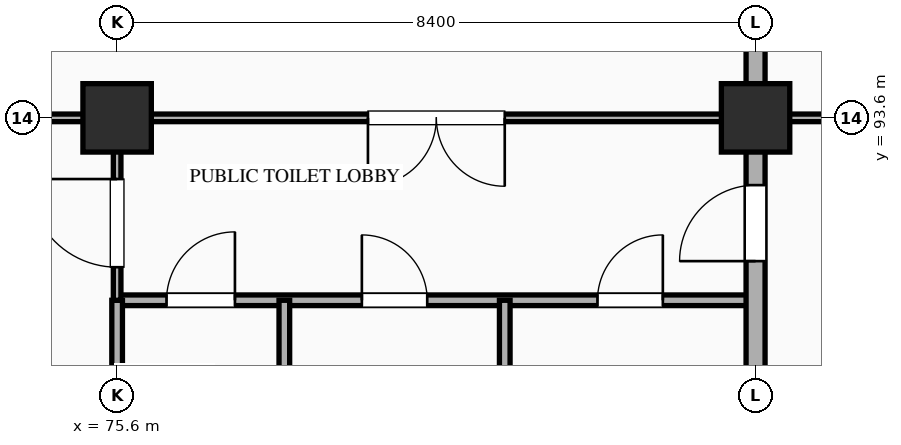
"""IFC4 building model, lengths in metres.
Left out: names, types, materials, properties, quantities, classifications, styles, units other than length and angle.
Written with IfcOpenShell. Run it as: python <this file> out.ifc"""

import sys

from ifc_helpers import new_model, si_unit, direction, frame, frame_2d, origin, origin_2d, place, context, subcontext, project, spatial, rectangle, extrude, element, fill, save


model = new_model("IFC4")
c1 = context("Model", 3, precision=1e-05, world=origin(), true_north=direction((0.0, 1.0)))
c2 = subcontext(c1, "Body", "Model", "MODEL_VIEW")
j1 = project(units=[si_unit("LENGTHUNIT", "METRE"), si_unit("PLANEANGLEUNIT", "RADIAN")], contexts=[c1])
p1 = place(None, origin())
s1 = spatial("IfcSite", under=j1, at=p1, CompositionType="ELEMENT")
p2 = place(p1, origin())
s2 = spatial("IfcBuilding", under=s1, at=p2, CompositionType="ELEMENT")
p3 = place(p2, origin())
s3 = spatial("IfcBuildingStorey", under=s2, at=p3, CompositionType="ELEMENT", Elevation=0.0)
for number, where, z_axis, x_axis in (
    (1, (75.6, 93.6, 0.0), (0.0, 0.0, 1.0), (1.0, 0.0, 0.0)),
    (2, (84.0, 93.6, 0.0), (0.0, 0.0, 1.0), (1.0, 0.0, 0.0)),
):
    element("IfcColumn", number, at=place(p3, frame(where, z_axis=z_axis, x_axis=x_axis)), inside=s3, PredefinedType="COLUMN", context=c2, shape_type="SweptSolid", body=[
        extrude(rectangle(XDim=0.9, YDim=0.9, at=origin_2d()), origin(), (0.0, 0.0, 1.0), 5.4),
    ])
p4 = place(p3, frame((75.6, 91.2, 0.0), z_axis=(0.0, 0.0, 1.0), x_axis=(1.0, 0.0, 0.0)))
e3 = element("IfcWall", 3, at=p4, inside=s3, PredefinedType="STANDARD", context=c2, shape_type="SweptSolid", body=[
    extrude(rectangle(XDim=8.4, YDim=0.14, at=frame_2d((4.2, 0.0))), origin(), (0.0, 0.0, 1.0), 5.12),
])
p5 = place(p4, frame((0.65, 0.0, 0.0)))
e4 = element("IfcOpeningElement", 4, at=p5, cuts=e3, PredefinedType="OPENING", context=c2, shape_type="SweptSolid", body=[
    extrude(rectangle(XDim=0.9, YDim=2.15, at=frame_2d((0.45, 1.075))), frame((0.0, 0.082, 0.0), z_axis=(0.0, -1.0, 0.0), x_axis=(1.0, 0.0, 0.0)), (0.0, 0.0, 1.0), 0.164),
])
p6 = place(p4, frame((3.22, 0.0, 0.0)))
e5 = element("IfcOpeningElement", 5, at=p6, cuts=e3, PredefinedType="OPENING", context=c2, shape_type="SweptSolid", body=[
    extrude(rectangle(XDim=0.86, YDim=2.1, at=frame_2d((0.43, 1.05))), frame((0.0, 0.082, 0.0), z_axis=(0.0, -1.0, 0.0), x_axis=(1.0, 0.0, 0.0)), (0.0, 0.0, 1.0), 0.164),
])
p7 = place(p4, frame((6.32, 0.0, 0.0)))
e6 = element("IfcOpeningElement", 6, at=p7, cuts=e3, PredefinedType="OPENING", context=c2, shape_type="SweptSolid", body=[
    extrude(rectangle(XDim=0.86, YDim=2.1, at=frame_2d((0.43, 1.05))), frame((0.0, 0.082, 0.0), z_axis=(0.0, -1.0, 0.0), x_axis=(1.0, 0.0, 0.0)), (0.0, 0.0, 1.0), 0.164),
])
p8 = place(p3, frame((67.2, 93.6, 0.0), z_axis=(0.0, 0.0, 1.0), x_axis=(1.0, 0.0, 0.0)))
e7 = element("IfcWall", 7, at=p8, inside=s3, PredefinedType="STANDARD", context=c2, shape_type="SweptSolid", body=[
    extrude(rectangle(XDim=33.6, YDim=0.1, at=frame_2d((16.8, 0.0))), origin(), (0.0, 0.0, 1.0), 4.27),
])
p9 = place(p8, frame((3.425, 0.0, 0.0)))
e8 = element("IfcOpeningElement", 8, at=p9, cuts=e7, PredefinedType="OPENING", context=c2, shape_type="SweptSolid", body=[
    extrude(rectangle(XDim=1.55, YDim=2.35, at=frame_2d((0.775, 1.175))), frame((0.0, 0.062, 0.0), z_axis=(0.0, -1.0, 0.0), x_axis=(1.0, 0.0, 0.0)), (0.0, 0.0, 1.0), 0.124),
])
p10 = place(p8, frame((28.55, 0.0, 0.0)))
e9 = element("IfcOpeningElement", 9, at=p10, cuts=e7, PredefinedType="OPENING", context=c2, shape_type="SweptSolid", body=[
    extrude(rectangle(XDim=1.7, YDim=2.45, at=frame_2d((0.85, 1.225))), frame((0.0, 0.062, 0.0), z_axis=(0.0, -1.0, 0.0), x_axis=(1.0, 0.0, 0.0)), (0.0, 0.0, 1.0), 0.124),
])
p11 = place(p8, frame((11.7, 0.0, 0.0)))
e10 = element("IfcOpeningElement", 10, at=p11, cuts=e7, PredefinedType="OPENING", context=c2, shape_type="SweptSolid", body=[
    extrude(rectangle(XDim=1.8, YDim=2.5, at=frame_2d((0.9, 1.25))), frame((0.0, 0.062, 0.0), z_axis=(0.0, -1.0, 0.0), x_axis=(1.0, 0.0, 0.0)), (0.0, 0.0, 1.0), 0.124),
])
p12 = place(p8, frame((17.885, 0.0, 0.0)))
e11 = element("IfcOpeningElement", 11, at=p12, cuts=e7, PredefinedType="OPENING", context=c2, shape_type="SweptSolid", body=[
    extrude(rectangle(XDim=1.0, YDim=2.25, at=frame_2d((0.5, 1.125))), frame((0.0, 0.062, 0.0), z_axis=(0.0, -1.0, 0.0), x_axis=(1.0, 0.0, 0.0)), (0.0, 0.0, 1.0), 0.124),
])
p13 = place(p8, frame((20.48, 0.0, 0.0)))
e12 = element("IfcOpeningElement", 12, at=p13, cuts=e7, PredefinedType="OPENING", context=c2, shape_type="SweptSolid", body=[
    extrude(rectangle(XDim=1.04, YDim=2.2, at=frame_2d((0.52, 1.1))), frame((0.0, 0.062, 0.0), z_axis=(0.0, -1.0, 0.0), x_axis=(1.0, 0.0, 0.0)), (0.0, 0.0, 1.0), 0.124),
])
p14 = place(p8, frame((23.075, 0.0, 0.0)))
e13 = element("IfcOpeningElement", 13, at=p14, cuts=e7, PredefinedType="OPENING", context=c2, shape_type="SweptSolid", body=[
    extrude(rectangle(XDim=1.08, YDim=2.25, at=frame_2d((0.54, 1.125))), frame((0.0, 0.062, 0.0), z_axis=(0.0, -1.0, 0.0), x_axis=(1.0, 0.0, 0.0)), (0.0, 0.0, 1.0), 0.124),
])
p15 = place(p3, frame((75.6, 89.2, 0.0), z_axis=(0.0, 0.0, 1.0), x_axis=(0.0, 1.0, 0.0)))
e14 = element("IfcWall", 14, at=p15, inside=s3, PredefinedType="STANDARD", context=c2, shape_type="SweptSolid", body=[
    extrude(rectangle(XDim=2.0, YDim=0.14, at=frame_2d((1.0, 0.0))), origin(), (0.0, 0.0, 1.0), 4.37),
])
p16 = place(p3, frame((75.6, 91.2, 0.0), z_axis=(0.0, 0.0, 1.0), x_axis=(0.0, 1.0, 0.0)))
e15 = element("IfcWall", 15, at=p16, inside=s3, PredefinedType="STANDARD", context=c2, shape_type="SweptSolid", body=[
    extrude(rectangle(XDim=2.4, YDim=0.1, at=frame_2d((1.2, 0.0))), origin(), (0.0, 0.0, 1.0), 4.37),
])
p17 = place(p16, frame((0.435, 0.0, 0.0)))
e16 = element("IfcOpeningElement", 16, at=p17, cuts=e15, PredefinedType="OPENING", context=c2, shape_type="SweptSolid", body=[
    extrude(rectangle(XDim=1.16, YDim=2.3, at=frame_2d((0.58, 1.15))), frame((0.0, 0.062, 0.0), z_axis=(0.0, -1.0, 0.0), x_axis=(1.0, 0.0, 0.0)), (0.0, 0.0, 1.0), 0.124),
])
for number, where, z_axis, x_axis in (
    (17, (77.8, 86.4, 0.0), (0.0, 0.0, 1.0), (0.0, 1.0, 0.0)),
    (18, (80.7, 86.4, 0.0), (0.0, 0.0, 1.0), (0.0, 1.0, 0.0)),
):
    element("IfcWall", number, at=place(p3, frame(where, z_axis=z_axis, x_axis=x_axis)), inside=s3, PredefinedType="STANDARD", context=c2, shape_type="SweptSolid", body=[
        extrude(rectangle(XDim=4.8, YDim=0.14, at=frame_2d((2.4, 0.0))), origin(), (0.0, 0.0, 1.0), 5.12),
    ])
p18 = place(p3, frame((84.0, 84.0, 0.0), z_axis=(0.0, 0.0, 1.0), x_axis=(0.0, 1.0, 0.0)))
e19 = element("IfcWall", 19, at=p18, inside=s3, PredefinedType="STANDARD", context=c2, shape_type="SweptSolid", body=[
    extrude(rectangle(XDim=12.0, YDim=0.25, at=frame_2d((6.0, 0.0))), origin(), (0.0, 0.0, 1.0), 4.37),
])
p19 = place(p18, frame((7.715, 0.0, 0.0)))
e20 = element("IfcOpeningElement", 20, at=p19, cuts=e19, PredefinedType="OPENING", context=c2, shape_type="SweptSolid", body=[
    extrude(rectangle(XDim=1.0, YDim=2.2, at=frame_2d((0.5, 1.1))), frame((0.0, 0.137, 0.0), z_axis=(0.0, -1.0, 0.0), x_axis=(1.0, 0.0, 0.0)), (0.0, 0.0, 1.0), 0.274),
])
p20 = place(p18, frame((10.485, 0.0, 0.0)))
e21 = element("IfcOpeningElement", 21, at=p20, cuts=e19, PredefinedType="OPENING", context=c2, shape_type="SweptSolid", body=[
    extrude(rectangle(XDim=1.0, YDim=2.2, at=frame_2d((0.5, 1.1))), frame((0.0, 0.137, 0.0), z_axis=(0.0, -1.0, 0.0), x_axis=(1.0, 0.0, 0.0)), (0.0, 0.0, 1.0), 0.274),
])
p21 = place(p18, frame((0.465, 0.0, 0.0)))
e22 = element("IfcOpeningElement", 22, at=p21, cuts=e19, PredefinedType="OPENING", context=c2, shape_type="SweptSolid", body=[
    extrude(rectangle(XDim=1.1, YDim=2.2, at=frame_2d((0.55, 1.1))), frame((0.0, 0.137, 0.0), z_axis=(0.0, -1.0, 0.0), x_axis=(1.0, 0.0, 0.0)), (0.0, 0.0, 1.0), 0.274),
])
p22 = place(p17, origin())
e23 = element("IfcDoor", 23, at=p22, inside=s3, OperationType="SINGLE_SWING_RIGHT", PredefinedType="DOOR", context=c2, shape_type="SweptSolid", body=[
    extrude(rectangle(XDim=1.16, YDim=2.3, at=frame_2d((0.58, 1.15))), frame((0.0, 0.025, 0.0), z_axis=(0.0, -1.0, 0.0), x_axis=(1.0, 0.0, 0.0)), (0.0, 0.0, 1.0), 0.05),
])
fill(e16, e23)
p23 = place(p5, origin())
e24 = element("IfcDoor", 24, at=p23, inside=s3, OperationType="SINGLE_SWING_RIGHT", PredefinedType="DOOR", context=c2, shape_type="SweptSolid", body=[
    extrude(rectangle(XDim=0.9, YDim=2.15, at=frame_2d((0.45, 1.075))), frame((0.0, 0.025, 0.0), z_axis=(0.0, -1.0, 0.0), x_axis=(1.0, 0.0, 0.0)), (0.0, 0.0, 1.0), 0.05),
])
fill(e4, e24)
p24 = place(p6, origin())
e25 = element("IfcDoor", 25, at=p24, inside=s3, OperationType="SINGLE_SWING_LEFT", PredefinedType="DOOR", context=c2, shape_type="SweptSolid", body=[
    extrude(rectangle(XDim=0.86, YDim=2.1, at=frame_2d((0.43, 1.05))), frame((0.0, 0.025, 0.0), z_axis=(0.0, -1.0, 0.0), x_axis=(1.0, 0.0, 0.0)), (0.0, 0.0, 1.0), 0.05),
])
fill(e5, e25)
p25 = place(p7, origin())
e26 = element("IfcDoor", 26, at=p25, inside=s3, OperationType="SINGLE_SWING_RIGHT", PredefinedType="DOOR", context=c2, shape_type="SweptSolid", body=[
    extrude(rectangle(XDim=0.86, YDim=2.1, at=frame_2d((0.43, 1.05))), frame((0.0, 0.025, 0.0), z_axis=(0.0, -1.0, 0.0), x_axis=(1.0, 0.0, 0.0)), (0.0, 0.0, 1.0), 0.05),
])
fill(e6, e26)
p26 = place(p11, frame((1.8, 0.0, 0.0), z_axis=(0.0, 0.0, 1.0), x_axis=(-1.0, 0.0, 0.0)))
e27 = element("IfcDoor", 27, at=p26, inside=s3, OperationType="DOUBLE_DOOR_SINGLE_SWING", PredefinedType="DOOR", context=c2, shape_type="SweptSolid", body=[
    extrude(rectangle(XDim=1.8, YDim=2.5, at=frame_2d((0.9, 1.25))), frame((0.0, 0.025, 0.0), z_axis=(0.0, -1.0, 0.0), x_axis=(1.0, 0.0, 0.0)), (0.0, 0.0, 1.0), 0.05),
])
fill(e10, e27)
p27 = place(p19, origin())
e28 = element("IfcDoor", 28, at=p27, inside=s3, OperationType="SINGLE_SWING_LEFT", PredefinedType="DOOR", context=c2, shape_type="SweptSolid", body=[
    extrude(rectangle(XDim=1.0, YDim=2.2, at=frame_2d((0.5, 1.1))), frame((0.0, 0.025, 0.0), z_axis=(0.0, -1.0, 0.0), x_axis=(1.0, 0.0, 0.0)), (0.0, 0.0, 1.0), 0.05),
])
fill(e20, e28)
save(model, sys.argv[1])
